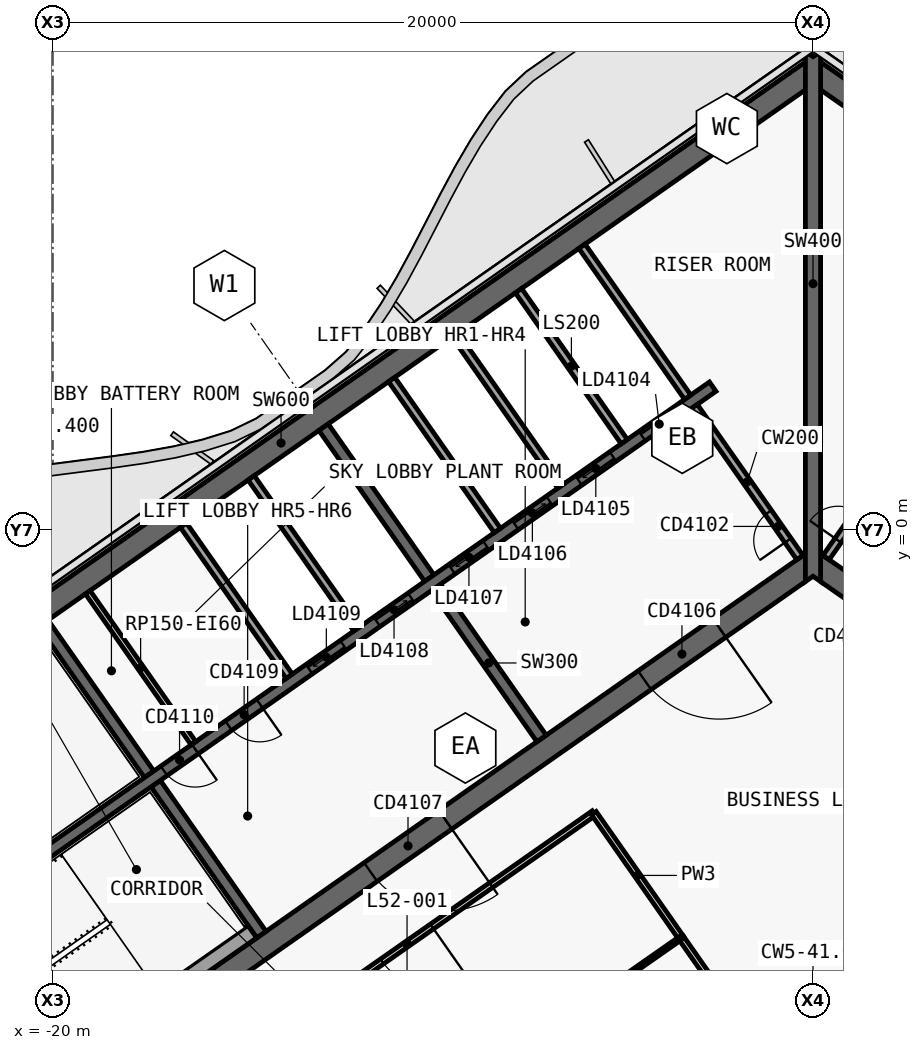
"""IFC4 building model, lengths in metres.
Left out: names, types, materials, properties, quantities, classifications, styles, units other than length and angle.
Written with IfcOpenShell. Run it as: python <this file> out.ifc"""

import sys

from ifc_helpers import new_model, si_unit, direction, frame, frame_2d, origin, place, context, subcontext, project, spatial, polyline, rectangle, outline, extrude, element, fill, save


model = new_model("IFC4")
c1 = context("Model", 3, precision=1e-05, world=origin(), true_north=direction((0.0, 1.0)))
c2 = subcontext(c1, "Body", "Model", "MODEL_VIEW")
j1 = project(units=[si_unit("LENGTHUNIT", "METRE"), si_unit("PLANEANGLEUNIT", "RADIAN")], contexts=[c1])
p1 = place(None, origin())
s1 = spatial("IfcSite", under=j1, at=p1, CompositionType="ELEMENT")
p2 = place(p1, origin())
s2 = spatial("IfcBuilding", under=s1, at=p2, CompositionType="ELEMENT")
p3 = place(p2, frame((0.0, 0.0, 225.4)))
s3 = spatial("IfcBuildingStorey", under=s2, at=p3, CompositionType="ELEMENT", Elevation=225.4)
p4 = place(p3, frame((-0.028, 12.066, 0.0), z_axis=(0.0, 0.0, 1.0), x_axis=(-0.819151382952, -0.573577380837, 0.0)))
e1 = element("IfcWall", 1, at=p4, inside=s3, PredefinedType="SHEAR", context=c2, shape_type="SweptSolid", body=[
    extrude(outline(polyline([(33.898, 0.3), (0.42, 0.3), (0.0, -0.3), (33.898, -0.3), (33.898, 0.3)])), origin(), (0.0, 0.0, 1.0), 3.9),
])
p5 = place(p3, frame((-0.028, -0.874, 0.0), z_axis=(0.0, 0.0, 1.0), x_axis=(-0.819150035022, -0.573579305871, 0.0)))
e2 = element("IfcWall", 2, at=p5, inside=s3, PredefinedType="SHEAR", context=c2, shape_type="SweptSolid", body=[
    extrude(outline(polyline([(26.476, 0.3), (0.42, 0.3), (0.0, -0.3), (26.476, -0.3), (26.476, 0.3)])), origin(), (0.0, 0.0, 1.0), 3.9),
])
p6 = place(p5, frame((2.976, 0.0, 0.0)))
e3 = element("IfcOpeningElement", 3, at=p6, cuts=e2, PredefinedType="OPENING", context=c2, shape_type="SweptSolid", body=[
    extrude(rectangle(XDim=2.4, YDim=2.1, at=frame_2d((1.2, 1.05))), frame((0.0, 0.31, 0.0), z_axis=(0.0, -1.0, 0.0), x_axis=(1.0, 0.0, 0.0)), (0.0, 0.0, 1.0), 0.62),
])
p7 = place(p5, frame((11.776, 0.0, 0.0)))
e4 = element("IfcOpeningElement", 4, at=p7, cuts=e2, PredefinedType="OPENING", context=c2, shape_type="SweptSolid", body=[
    extrude(rectangle(XDim=2.4, YDim=2.1, at=frame_2d((1.2, 1.05))), frame((0.0, 0.31, 0.0), z_axis=(0.0, -1.0, 0.0), x_axis=(1.0, 0.0, 0.0)), (0.0, 0.0, 1.0), 0.62),
])
p8 = place(p3, frame((-7.143, -5.49, 0.0), z_axis=(0.0, 0.0, 1.0), x_axis=(-0.573617744349, 0.819123118565, 0.0)))
e5 = element("IfcWall", 5, at=p8, inside=s3, PredefinedType="SHEAR", context=c2, shape_type="SweptSolid", body=[
    extrude(outline(polyline([(4.85, 0.15), (0.0, 0.15), (0.0, -0.15), (4.85, -0.15), (4.85, 0.15)])), origin(), (0.0, 0.0, 1.0), 3.9),
])
p9 = place(p3, frame((-10.097, -1.271, 0.0), z_axis=(0.0, 0.0, 1.0), x_axis=(-0.573560315113, 0.819163332265, 0.0)))
e6 = element("IfcWall", 6, at=p9, inside=s3, PredefinedType="SHEAR", context=c2, shape_type="SweptSolid", body=[
    extrude(outline(polyline([(4.85, -0.15), (4.85, 0.15), (0.0, 0.15), (0.0, -0.15), (4.85, -0.15)])), origin(), (0.0, 0.0, 1.0), 3.9),
])
p10 = place(p3, frame((-14.515, -10.652, 0.0), z_axis=(0.0, 0.0, 1.0), x_axis=(-0.573560315113, 0.819163332265, 0.0)))
e7 = element("IfcWall", 7, at=p10, inside=s3, PredefinedType="SHEAR", context=c2, shape_type="SweptSolid", body=[
    extrude(outline(polyline([(4.85, 0.15), (0.0, 0.15), (0.0, -0.15), (4.85, -0.15), (4.85, 0.15)])), origin(), (0.0, 0.0, 1.0), 3.9),
])
p11 = place(p3, frame((-17.469, -6.433, 0.0), z_axis=(0.0, 0.0, 1.0), x_axis=(-0.573594092424, 0.81913968109, 0.0)))
e8 = element("IfcWall", 8, at=p11, inside=s3, PredefinedType="SHEAR", context=c2, shape_type="SweptSolid", body=[
    extrude(outline(polyline([(4.85, -0.15), (4.85, 0.15), (0.0, 0.15), (0.0, -0.15), (4.85, -0.15)])), origin(), (0.0, 0.0, 1.0), 3.9),
])
p12 = place(p3, frame((-2.638, 3.768, 0.0), z_axis=(0.0, 0.0, 1.0), x_axis=(-0.819155014212, -0.573572194837, 0.0)))
e9 = element("IfcWall", 9, at=p12, inside=s3, PredefinedType="SHEAR", context=c2, shape_type="SweptSolid", body=[
    extrude(outline(polyline([(26.4, 0.15), (0.0, 0.15), (0.0, -0.15), (26.4, -0.15), (26.4, 0.15)])), origin(), (0.0, 0.0, 1.0), 3.9),
])
p13 = place(p12, frame((1.169, 0.0, 0.0)))
e10 = element("IfcOpeningElement", 10, at=p13, cuts=e9, PredefinedType="OPENING", context=c2, shape_type="SweptSolid", body=[
    extrude(rectangle(XDim=1.1, YDim=2.1, at=frame_2d((0.55, 1.05))), frame((0.0, 0.16, 0.0), z_axis=(0.0, -1.0, 0.0), x_axis=(1.0, 0.0, 0.0)), (0.0, 0.0, 1.0), 0.32),
])
p14 = place(p12, frame((3.206, 0.0, 0.0)))
e11 = element("IfcOpeningElement", 11, at=p14, cuts=e9, PredefinedType="OPENING", context=c2, shape_type="SweptSolid", body=[
    extrude(rectangle(XDim=1.1, YDim=2.1, at=frame_2d((0.55, 1.05))), frame((0.0, 0.16, 0.0), z_axis=(0.0, -1.0, 0.0), x_axis=(1.0, 0.0, 0.0)), (0.0, 0.0, 1.0), 0.32),
])
p15 = place(p12, frame((5.244, 0.0, 0.0)))
e12 = element("IfcOpeningElement", 12, at=p15, cuts=e9, PredefinedType="OPENING", context=c2, shape_type="SweptSolid", body=[
    extrude(rectangle(XDim=1.1, YDim=2.1, at=frame_2d((0.55, 1.05))), frame((0.0, 0.16, 0.0), z_axis=(0.0, -1.0, 0.0), x_axis=(1.0, 0.0, 0.0)), (0.0, 0.0, 1.0), 0.32),
])
p16 = place(p12, frame((7.281, 0.0, 0.0)))
e13 = element("IfcOpeningElement", 13, at=p16, cuts=e9, PredefinedType="OPENING", context=c2, shape_type="SweptSolid", body=[
    extrude(rectangle(XDim=1.1, YDim=2.1, at=frame_2d((0.55, 1.05))), frame((0.0, 0.16, 0.0), z_axis=(0.0, -1.0, 0.0), x_axis=(1.0, 0.0, 0.0)), (0.0, 0.0, 1.0), 0.32),
])
p17 = place(p12, frame((9.688, 0.0, 0.0)))
e14 = element("IfcOpeningElement", 14, at=p17, cuts=e9, PredefinedType="OPENING", context=c2, shape_type="SweptSolid", body=[
    extrude(rectangle(XDim=1.1, YDim=2.1, at=frame_2d((0.55, 1.05))), frame((0.0, 0.16, 0.0), z_axis=(0.0, -1.0, 0.0), x_axis=(1.0, 0.0, 0.0)), (0.0, 0.0, 1.0), 0.32),
])
p18 = place(p12, frame((11.863, 0.0, 0.0)))
e15 = element("IfcOpeningElement", 15, at=p18, cuts=e9, PredefinedType="OPENING", context=c2, shape_type="SweptSolid", body=[
    extrude(rectangle(XDim=1.1, YDim=2.1, at=frame_2d((0.55, 1.05))), frame((0.0, 0.16, 0.0), z_axis=(0.0, -1.0, 0.0), x_axis=(1.0, 0.0, 0.0)), (0.0, 0.0, 1.0), 0.32),
])
p19 = place(p12, frame((14.552, 0.0, 0.0)))
e16 = element("IfcOpeningElement", 16, at=p19, cuts=e9, PredefinedType="OPENING", context=c2, shape_type="SweptSolid", body=[
    extrude(rectangle(XDim=1.0, YDim=2.1, at=frame_2d((0.5, 1.05))), frame((0.0, 0.16, 0.0), z_axis=(0.0, -1.0, 0.0), x_axis=(1.0, 0.0, 0.0)), (0.0, 0.0, 1.0), 0.32),
])
p20 = place(p12, frame((16.627, 0.0, 0.0)))
e17 = element("IfcOpeningElement", 17, at=p20, cuts=e9, PredefinedType="OPENING", context=c2, shape_type="SweptSolid", body=[
    extrude(rectangle(XDim=1.0, YDim=2.1, at=frame_2d((0.5, 1.05))), frame((0.0, 0.16, 0.0), z_axis=(0.0, -1.0, 0.0), x_axis=(1.0, 0.0, 0.0)), (0.0, 0.0, 1.0), 0.32),
])
p21 = place(p3, frame((0.028, 12.066, 0.0), z_axis=(0.0, 0.0, 1.0), x_axis=(0.819151382952, -0.573577380837, 0.0)))
e18 = element("IfcWall", 18, at=p21, inside=s3, PredefinedType="SHEAR", context=c2, shape_type="SweptSolid", body=[
    extrude(outline(polyline([(33.898, 0.3), (0.0, 0.3), (0.42, -0.3), (33.898, -0.3), (33.898, 0.3)])), origin(), (0.0, 0.0, 1.0), 3.9),
])
p22 = place(p3, frame((0.028, -0.874, 0.0), z_axis=(0.0, 0.0, 1.0), x_axis=(0.819150035022, -0.573579305871, 0.0)))
e19 = element("IfcWall", 19, at=p22, inside=s3, PredefinedType="SHEAR", context=c2, shape_type="SweptSolid", body=[
    extrude(outline(polyline([(26.476, 0.3), (0.0, 0.3), (0.42, -0.3), (26.476, -0.3), (26.476, 0.3)])), origin(), (0.0, 0.0, 1.0), 3.9),
])
p23 = place(p22, frame((6.576, 0.0, 0.0)))
e20 = element("IfcOpeningElement", 20, at=p23, cuts=e19, PredefinedType="OPENING", context=c2, shape_type="SweptSolid", body=[
    extrude(rectangle(XDim=1.5, YDim=2.1, at=frame_2d((0.75, 1.05))), frame((0.0, 0.31, 0.0), z_axis=(0.0, -1.0, 0.0), x_axis=(1.0, 0.0, 0.0)), (0.0, 0.0, 1.0), 0.62),
])
p24 = place(p22, frame((12.226, 0.0, 0.0)))
e21 = element("IfcOpeningElement", 21, at=p24, cuts=e19, PredefinedType="OPENING", context=c2, shape_type="SweptSolid", body=[
    extrude(rectangle(XDim=1.5, YDim=2.1, at=frame_2d((0.75, 1.05))), frame((0.0, 0.31, 0.0), z_axis=(0.0, -1.0, 0.0), x_axis=(1.0, 0.0, 0.0)), (0.0, 0.0, 1.0), 0.62),
])
p25 = place(p3, frame((0.0, -1.361, 0.0), z_axis=(0.0, 0.0, 1.0), x_axis=(0.0, 1.0, 0.0)))
e22 = element("IfcWall", 22, at=p25, inside=s3, PredefinedType="SHEAR", context=c2, shape_type="SweptSolid", body=[
    extrude(outline(polyline([(0.14, 0.2), (0.0, 0.2), (0.14, 0.0), (0.0, -0.2), (0.14, -0.2), (1.012, -0.2), (12.94, -0.2), (13.813, -0.2), (13.893, -0.2), (13.933, -0.172), (13.813, 0.0), (13.933, 0.172), (13.893, 0.2), (13.813, 0.2), (12.94, 0.2), (1.012, 0.2), (0.14, 0.2)])), origin(), (0.0, 0.0, 1.0), 3.9),
])
p26 = place(p3, frame((-4.967, 2.321, 0.0), z_axis=(0.0, 0.0, 1.0), x_axis=(-0.573594092424, 0.81913968109, 0.0)))
e23 = element("IfcWall", 23, at=p26, inside=s3, PredefinedType="SOLIDWALL", context=c2, shape_type="SweptSolid", body=[
    extrude(rectangle(XDim=4.85, YDim=0.2, at=frame_2d((2.425, 0.0))), origin(), (0.0, 0.0, 1.0), 3.9),
])
p27 = place(p3, frame((-6.636, 1.152, 0.0), z_axis=(0.0, 0.0, 1.0), x_axis=(-0.573560315113, 0.819163332265, 0.0)))
e24 = element("IfcWall", 24, at=p27, inside=s3, PredefinedType="SOLIDWALL", context=c2, shape_type="SweptSolid", body=[
    extrude(rectangle(XDim=4.85, YDim=0.2, at=frame_2d((2.425, 0.0))), origin(), (0.0, 0.0, 1.0), 3.9),
])
p28 = place(p3, frame((-8.305, -0.017, 0.0), z_axis=(0.0, 0.0, 1.0), x_axis=(-0.573594092424, 0.81913968109, 0.0)))
e25 = element("IfcWall", 25, at=p28, inside=s3, PredefinedType="SOLIDWALL", context=c2, shape_type="SweptSolid", body=[
    extrude(rectangle(XDim=4.85, YDim=0.2, at=frame_2d((2.425, 0.0))), origin(), (0.0, 0.0, 1.0), 3.9),
])
p29 = place(p3, frame((-16.302, -5.616, 0.0), z_axis=(0.0, 0.0, 1.0), x_axis=(-0.573560315113, 0.819163332265, 0.0)))
e26 = element("IfcWall", 26, at=p29, inside=s3, PredefinedType="PARTITIONING", context=c2, shape_type="SweptSolid", body=[
    extrude(rectangle(XDim=4.85, YDim=0.15, at=frame_2d((2.425, 0.0))), origin(), (0.0, 0.0, 1.0), 3.62),
])
p30 = place(p3, frame((-12.001, -2.605, 0.0), z_axis=(0.0, 0.0, 1.0), x_axis=(-0.573560315113, 0.819163332265, 0.0)))
e27 = element("IfcWall", 27, at=p30, inside=s3, PredefinedType="SOLIDWALL", context=c2, shape_type="SweptSolid", body=[
    extrude(rectangle(XDim=4.85, YDim=0.2, at=frame_2d((2.425, 0.0))), origin(), (0.0, 0.0, 1.0), 3.9),
])
p31 = place(p3, frame((-13.783, -3.852, 0.0), z_axis=(0.0, 0.0, 1.0), x_axis=(-0.573594092424, 0.81913968109, 0.0)))
e28 = element("IfcWall", 28, at=p31, inside=s3, PredefinedType="SOLIDWALL", context=c2, shape_type="SweptSolid", body=[
    extrude(rectangle(XDim=4.85, YDim=0.2, at=frame_2d((2.425, 0.0))), origin(), (0.0, 0.0, 1.0), 3.9),
])
p32 = place(p3, frame((-14.753, -10.574, 0.0), z_axis=(0.0, 0.0, 1.0), x_axis=(-0.819158229677, -0.573567602601, 0.0)))
e29 = element("IfcWall", 29, at=p32, inside=s3, PredefinedType="SOLIDWALL", context=c2, shape_type="SweptSolid", body=[
    extrude(rectangle(XDim=8.25, YDim=0.4, at=frame_2d((4.125, 0.0))), origin(), (0.0, 0.0, 1.0), 3.62),
])
p33 = place(p3, frame((-0.344, -0.729, 0.0), z_axis=(0.0, 0.0, 1.0), x_axis=(-0.573560315113, 0.819163332265, 0.0)))
e30 = element("IfcWall", 30, at=p33, inside=s3, PredefinedType="SOLIDWALL", context=c2, shape_type="SweptSolid", body=[
    extrude(rectangle(XDim=4.85, YDim=0.2, at=frame_2d((2.425, 0.0))), origin(), (0.0, 0.0, 1.0), 3.62),
])
p34 = place(p33, frame((0.55, 0.0, 0.0)))
e31 = element("IfcOpeningElement", 31, at=p34, cuts=e30, PredefinedType="OPENING", context=c2, shape_type="SweptSolid", body=[
    extrude(rectangle(XDim=0.9, YDim=2.1, at=frame_2d((0.45, 1.05))), frame((0.0, 0.11, 0.0), z_axis=(0.0, -1.0, 0.0), x_axis=(1.0, 0.0, 0.0)), (0.0, 0.0, 1.0), 0.22),
])
p35 = place(p3, frame((-3.298, 3.49, 0.0), z_axis=(0.0, 0.0, 1.0), x_axis=(-0.573560315113, 0.819163332265, 0.0)))
e32 = element("IfcWall", 32, at=p35, inside=s3, PredefinedType="SOLIDWALL", context=c2, shape_type="SweptSolid", body=[
    extrude(rectangle(XDim=4.85, YDim=0.2, at=frame_2d((2.425, 0.0))), origin(), (0.0, 0.0, 1.0), 3.62),
])
p36 = place(p3, frame((0.344, -0.729, 0.0), z_axis=(0.0, 0.0, 1.0), x_axis=(0.573560315113, 0.819163332265, 0.0)))
e33 = element("IfcWall", 33, at=p36, inside=s3, PredefinedType="SOLIDWALL", context=c2, shape_type="SweptSolid", body=[
    extrude(rectangle(XDim=4.85, YDim=0.2, at=frame_2d((2.425, 0.0))), origin(), (0.0, 0.0, 1.0), 3.62),
])
p37 = place(p36, frame((0.55, 0.0, 0.0)))
e34 = element("IfcOpeningElement", 34, at=p37, cuts=e33, PredefinedType="OPENING", context=c2, shape_type="SweptSolid", body=[
    extrude(rectangle(XDim=0.9, YDim=2.1, at=frame_2d((0.45, 1.05))), frame((0.0, 0.11, 0.0), z_axis=(0.0, -1.0, 0.0), x_axis=(1.0, 0.0, 0.0)), (0.0, 0.0, 1.0), 0.22),
])
p38 = place(p3, frame((-5.766, -7.456, 0.0), z_axis=(0.0, 0.0, 1.0), x_axis=(-0.81915546166, -0.573571555809, 0.0)))
e35 = element("IfcWall", 35, at=p38, inside=s3, PredefinedType="PARTITIONING", context=c2, shape_type="SweptSolid", body=[
    extrude(rectangle(XDim=12.002, YDim=0.15, at=frame_2d((6.001, 0.0))), origin(), (0.0, 0.0, 1.0), 3.05),
])
p39 = place(p38, frame((5.201, 0.0, 0.0)))
e36 = element("IfcOpeningElement", 36, at=p39, cuts=e35, PredefinedType="OPENING", context=c2, shape_type="SweptSolid", body=[
    extrude(rectangle(XDim=1.6, YDim=2.1, at=frame_2d((0.8, 1.05))), frame((0.0, 0.085, 0.0), z_axis=(0.0, -1.0, 0.0), x_axis=(1.0, 0.0, 0.0)), (0.0, 0.0, 1.0), 0.17),
])
p40 = place(p3, frame((-1.849, -13.051, 0.0), z_axis=(0.0, 0.0, 1.0), x_axis=(-0.57360125079, 0.819134668472, 0.0)))
e37 = element("IfcWall", 37, at=p40, inside=s3, PredefinedType="PARTITIONING", context=c2, shape_type="SweptSolid", body=[
    extrude(rectangle(XDim=2.831, YDim=0.15, at=frame_2d((1.416, 0.0))), origin(), (0.0, 0.0, 1.0), 3.05),
])
p41 = place(p3, frame((-3.471, -10.734, 0.0), z_axis=(0.0, 0.0, 1.0), x_axis=(-0.573564642091, 0.819160302593, 0.0)))
e38 = element("IfcWall", 38, at=p41, inside=s3, PredefinedType="PARTITIONING", context=c2, shape_type="SweptSolid", body=[
    extrude(rectangle(XDim=4.004, YDim=0.15, at=frame_2d((2.002, 0.0))), origin(), (0.0, 0.0, 1.0), 3.05),
])
p42 = place(p3, frame((-3.471, -10.733, 0.0), z_axis=(0.0, 0.0, 1.0), x_axis=(-0.819146845232, -0.573583861302, 0.0)))
e39 = element("IfcWall", 39, at=p42, inside=s3, PredefinedType="PARTITIONING", context=c2, shape_type="SweptSolid", body=[
    extrude(rectangle(XDim=12.0, YDim=0.1, at=frame_2d((6.0, 0.0))), origin(), (0.0, 0.0, 1.0), 3.05),
])
p43 = place(p42, frame((5.55, 0.0, 0.0)))
e40 = element("IfcOpeningElement", 40, at=p43, cuts=e39, PredefinedType="OPENING", context=c2, shape_type="SweptSolid", body=[
    extrude(rectangle(XDim=0.9, YDim=2.1, at=frame_2d((0.45, 1.05))), frame((0.0, 0.06, 0.0), z_axis=(0.0, -1.0, 0.0), x_axis=(1.0, 0.0, 0.0)), (0.0, 0.0, 1.0), 0.12),
])
p44 = place(p13, origin())
e41 = element("IfcDoor", 41, at=p44, inside=s3, OperationType="SLIDING_TO_LEFT", PredefinedType="DOOR", context=c2, shape_type="SweptSolid", body=[
    extrude(rectangle(XDim=1.1, YDim=2.1, at=frame_2d((0.55, 1.05))), frame((0.0, 0.025, 0.0), z_axis=(0.0, -1.0, 0.0), x_axis=(1.0, 0.0, 0.0)), (0.0, 0.0, 1.0), 0.05),
])
fill(e10, e41)
p45 = place(p14, origin())
e42 = element("IfcDoor", 42, at=p45, inside=s3, OperationType="SLIDING_TO_RIGHT", PredefinedType="DOOR", context=c2, shape_type="SweptSolid", body=[
    extrude(rectangle(XDim=1.1, YDim=2.1, at=frame_2d((0.55, 1.05))), frame((0.0, 0.025, 0.0), z_axis=(0.0, -1.0, 0.0), x_axis=(1.0, 0.0, 0.0)), (0.0, 0.0, 1.0), 0.05),
])
fill(e11, e42)
p46 = place(p15, origin())
e43 = element("IfcDoor", 43, at=p46, inside=s3, OperationType="SLIDING_TO_LEFT", PredefinedType="DOOR", context=c2, shape_type="SweptSolid", body=[
    extrude(rectangle(XDim=1.1, YDim=2.1, at=frame_2d((0.55, 1.05))), frame((0.0, 0.025, 0.0), z_axis=(0.0, -1.0, 0.0), x_axis=(1.0, 0.0, 0.0)), (0.0, 0.0, 1.0), 0.05),
])
fill(e12, e43)
p47 = place(p16, origin())
e44 = element("IfcDoor", 44, at=p47, inside=s3, OperationType="SLIDING_TO_RIGHT", PredefinedType="DOOR", context=c2, shape_type="SweptSolid", body=[
    extrude(rectangle(XDim=1.1, YDim=2.1, at=frame_2d((0.55, 1.05))), frame((0.0, 0.025, 0.0), z_axis=(0.0, -1.0, 0.0), x_axis=(1.0, 0.0, 0.0)), (0.0, 0.0, 1.0), 0.05),
])
fill(e13, e44)
p48 = place(p17, origin())
e45 = element("IfcDoor", 45, at=p48, inside=s3, OperationType="SLIDING_TO_LEFT", PredefinedType="DOOR", context=c2, shape_type="SweptSolid", body=[
    extrude(rectangle(XDim=1.1, YDim=2.1, at=frame_2d((0.55, 1.05))), frame((0.0, 0.025, 0.0), z_axis=(0.0, -1.0, 0.0), x_axis=(1.0, 0.0, 0.0)), (0.0, 0.0, 1.0), 0.05),
])
fill(e14, e45)
p49 = place(p18, origin())
e46 = element("IfcDoor", 46, at=p49, inside=s3, OperationType="SLIDING_TO_RIGHT", PredefinedType="DOOR", context=c2, shape_type="SweptSolid", body=[
    extrude(rectangle(XDim=1.1, YDim=2.1, at=frame_2d((0.55, 1.05))), frame((0.0, 0.025, 0.0), z_axis=(0.0, -1.0, 0.0), x_axis=(1.0, 0.0, 0.0)), (0.0, 0.0, 1.0), 0.05),
])
fill(e15, e46)
p50 = place(p19, origin())
e47 = element("IfcDoor", 47, at=p50, inside=s3, OperationType="SINGLE_SWING_RIGHT", PredefinedType="DOOR", context=c2, shape_type="SweptSolid", body=[
    extrude(rectangle(XDim=1.0, YDim=2.1, at=frame_2d((0.5, 1.05))), frame((0.0, 0.025, 0.0), z_axis=(0.0, -1.0, 0.0), x_axis=(1.0, 0.0, 0.0)), (0.0, 0.0, 1.0), 0.05),
])
fill(e16, e47)
p51 = place(p20, origin())
e48 = element("IfcDoor", 48, at=p51, inside=s3, OperationType="SINGLE_SWING_RIGHT", PredefinedType="DOOR", context=c2, shape_type="SweptSolid", body=[
    extrude(rectangle(XDim=1.0, YDim=2.1, at=frame_2d((0.5, 1.05))), frame((0.0, 0.025, 0.0), z_axis=(0.0, -1.0, 0.0), x_axis=(1.0, 0.0, 0.0)), (0.0, 0.0, 1.0), 0.05),
])
fill(e17, e48)
p52 = place(p6, origin())
e49 = element("IfcDoor", 49, at=p52, inside=s3, OperationType="DOUBLE_DOOR_SINGLE_SWING", PredefinedType="DOOR", context=c2, shape_type="SweptSolid", body=[
    extrude(rectangle(XDim=2.4, YDim=2.1, at=frame_2d((1.2, 1.05))), frame((0.0, 0.025, 0.0), z_axis=(0.0, -1.0, 0.0), x_axis=(1.0, 0.0, 0.0)), (0.0, 0.0, 1.0), 0.05),
])
fill(e3, e49)
p53 = place(p7, origin())
e50 = element("IfcDoor", 50, at=p53, inside=s3, OperationType="DOUBLE_DOOR_SINGLE_SWING", PredefinedType="DOOR", context=c2, shape_type="SweptSolid", body=[
    extrude(rectangle(XDim=2.4, YDim=2.1, at=frame_2d((1.2, 1.05))), frame((0.0, 0.025, 0.0), z_axis=(0.0, -1.0, 0.0), x_axis=(1.0, 0.0, 0.0)), (0.0, 0.0, 1.0), 0.05),
])
fill(e4, e50)
p54 = place(p34, origin())
e51 = element("IfcDoor", 51, at=p54, inside=s3, OperationType="SINGLE_SWING_RIGHT", PredefinedType="DOOR", context=c2, shape_type="SweptSolid", body=[
    extrude(rectangle(XDim=0.9, YDim=2.1, at=frame_2d((0.45, 1.05))), frame((0.0, 0.025, 0.0), z_axis=(0.0, -1.0, 0.0), x_axis=(1.0, 0.0, 0.0)), (0.0, 0.0, 1.0), 0.05),
])
fill(e31, e51)
p55 = place(p37, origin())
e52 = element("IfcDoor", 52, at=p55, inside=s3, OperationType="SINGLE_SWING_RIGHT", PredefinedType="DOOR", context=c2, shape_type="SweptSolid", body=[
    extrude(rectangle(XDim=0.9, YDim=2.1, at=frame_2d((0.45, 1.05))), frame((0.0, 0.025, 0.0), z_axis=(0.0, -1.0, 0.0), x_axis=(1.0, 0.0, 0.0)), (0.0, 0.0, 1.0), 0.05),
])
fill(e34, e52)
p56 = place(p39, origin())
e53 = element("IfcDoor", 53, at=p56, inside=s3, OperationType="DOUBLE_DOOR_SINGLE_SWING", PredefinedType="DOOR", context=c2, shape_type="SweptSolid", body=[
    extrude(rectangle(XDim=1.6, YDim=2.1, at=frame_2d((0.8, 1.05))), frame((0.0, 0.025, 0.0), z_axis=(0.0, -1.0, 0.0), x_axis=(1.0, 0.0, 0.0)), (0.0, 0.0, 1.0), 0.05),
])
fill(e36, e53)
save(model, sys.argv[1])
